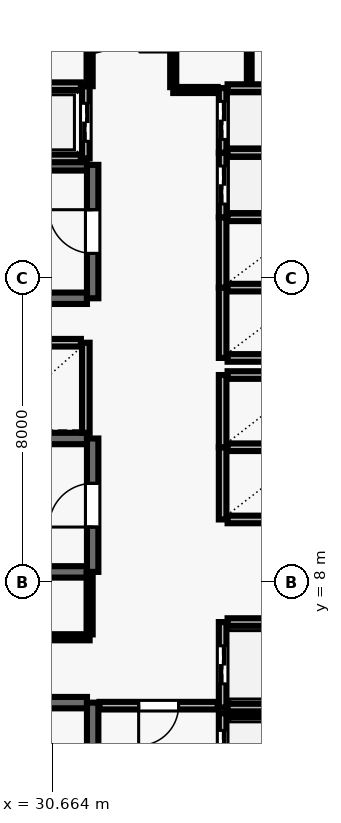
"""IFC4 building model, lengths in metres.
Left out: names, types, materials, properties, quantities, classifications, styles, units other than length and angle.
Written with IfcOpenShell. Run it as: python <this file> out.ifc"""

import sys

from ifc_helpers import new_model, si_unit, direction, frame, frame_2d, origin, place, context, subcontext, project, spatial, rectangle, extrude, element, fill, save


model = new_model("IFC4")
c1 = context("Model", 3, precision=1e-05, world=origin(), true_north=direction((0.0, 1.0)))
c2 = subcontext(c1, "Body", "Model", "MODEL_VIEW")
j1 = project(units=[si_unit("LENGTHUNIT", "METRE"), si_unit("PLANEANGLEUNIT", "RADIAN")], contexts=[c1])
p1 = place(None, origin())
s1 = spatial("IfcSite", under=j1, at=p1, CompositionType="ELEMENT")
p2 = place(p1, origin())
s2 = spatial("IfcBuilding", under=s1, at=p2, CompositionType="ELEMENT")
p3 = place(p2, frame((0.0, 0.0, 158.0)))
s3 = spatial("IfcBuildingStorey", under=s2, at=p3, CompositionType="ELEMENT", Elevation=158.0)
p4 = place(p3, frame((31.58, 4.83, 0.0), z_axis=(0.0, 0.0, 1.0), x_axis=(-1.0, 0.0, 0.0)))
e1 = element("IfcWall", 1, at=p4, inside=s3, PredefinedType="SHEAR", context=c2, shape_type="SweptSolid", body=[
    extrude(rectangle(XDim=8.36, YDim=0.3, at=frame_2d((4.18, 0.0))), origin(), (0.0, 0.0, 1.0), 3.69),
])
p5 = place(p3, frame((31.73, 0.96, 0.0), z_axis=(0.0, 0.0, 1.0), x_axis=(0.0, 1.0, 0.0)))
e2 = element("IfcWall", 2, at=p5, inside=s3, PredefinedType="SHEAR", context=c2, shape_type="SweptSolid", body=[
    extrude(rectangle(XDim=3.87, YDim=0.3, at=frame_2d((1.935, 0.0))), origin(), (0.0, 0.0, 1.0), 3.69),
])
p6 = place(p5, frame((1.54, 0.0, 0.0)))
e3 = element("IfcOpeningElement", 3, at=p6, cuts=e2, PredefinedType="OPENING", context=c2, shape_type="SweptSolid", body=[
    extrude(rectangle(XDim=1.15, YDim=2.15, at=frame_2d((0.575, 1.075))), frame((0.0, 0.16, 0.0), z_axis=(0.0, -1.0, 0.0), x_axis=(1.0, 0.0, 0.0)), (0.0, 0.0, 1.0), 0.32),
])
for number, where, z_axis, x_axis in (
    (4, (31.58, 18.98, 0.0), (0.0, 0.0, 1.0), (-1.0, 0.0, 0.0)),
    (5, (23.22, 15.47, 0.0), (0.0, 0.0, 1.0), (1.0, 0.0, 0.0)),
):
    element("IfcWall", number, at=place(p3, frame(where, z_axis=z_axis, x_axis=x_axis)), inside=s3, PredefinedType="SHEAR", context=c2, shape_type="SweptSolid", body=[
        extrude(rectangle(XDim=8.36, YDim=0.3, at=frame_2d((4.18, 0.0))), origin(), (0.0, 0.0, 1.0), 3.69),
    ])
p7 = place(p3, frame((31.73, 15.47, 0.0), z_axis=(0.0, 0.0, 1.0), x_axis=(0.0, 1.0, 0.0)))
e6 = element("IfcWall", 6, at=p7, inside=s3, PredefinedType="SHEAR", context=c2, shape_type="SweptSolid", body=[
    extrude(rectangle(XDim=3.51, YDim=0.3, at=frame_2d((1.755, 0.0))), origin(), (0.0, 0.0, 1.0), 3.69),
])
p8 = place(p7, frame((1.18, 0.0, 0.0)))
e7 = element("IfcOpeningElement", 7, at=p8, cuts=e6, PredefinedType="OPENING", context=c2, shape_type="SweptSolid", body=[
    extrude(rectangle(XDim=1.15, YDim=2.15, at=frame_2d((0.575, 1.075))), frame((0.0, 0.16, 0.0), z_axis=(0.0, -1.0, 0.0), x_axis=(1.0, 0.0, 0.0)), (0.0, 0.0, 1.0), 0.32),
])
for number, where, z_axis, x_axis in (
    (8, (31.58, 11.78, 0.0), (0.0, 0.0, 1.0), (-1.0, 0.0, 0.0)),
    (9, (23.22, 8.27, 0.0), (0.0, 0.0, 1.0), (1.0, 0.0, 0.0)),
):
    element("IfcWall", number, at=place(p3, frame(where, z_axis=z_axis, x_axis=x_axis)), inside=s3, PredefinedType="SHEAR", context=c2, shape_type="SweptSolid", body=[
        extrude(rectangle(XDim=8.36, YDim=0.3, at=frame_2d((4.18, 0.0))), origin(), (0.0, 0.0, 1.0), 3.69),
    ])
p9 = place(p3, frame((31.73, 8.27, 0.0), z_axis=(0.0, 0.0, 1.0), x_axis=(0.0, 1.0, 0.0)))
e10 = element("IfcWall", 10, at=p9, inside=s3, PredefinedType="SHEAR", context=c2, shape_type="SweptSolid", body=[
    extrude(rectangle(XDim=3.51, YDim=0.3, at=frame_2d((1.755, 0.0))), origin(), (0.0, 0.0, 1.0), 3.69),
])
p10 = place(p9, frame((1.18, 0.0, 0.0)))
e11 = element("IfcOpeningElement", 11, at=p10, cuts=e10, PredefinedType="OPENING", context=c2, shape_type="SweptSolid", body=[
    extrude(rectangle(XDim=1.15, YDim=2.15, at=frame_2d((0.575, 1.075))), frame((0.0, 0.16, 0.0), z_axis=(0.0, -1.0, 0.0), x_axis=(1.0, 0.0, 0.0)), (0.0, 0.0, 1.0), 0.32),
])
p11 = place(p3, frame((35.15, 4.55, 0.0), z_axis=(0.0, 0.0, 1.0), x_axis=(0.0, -1.0, 0.0)))
e12 = element("IfcWall", 12, at=p11, inside=s3, PredefinedType="SOLIDWALL", context=c2, shape_type="SweptSolid", body=[
    extrude(rectangle(XDim=2.1, YDim=0.2, at=frame_2d((1.05, 0.0))), origin(), (0.0, 0.0, 1.0), 3.69),
])
p12 = place(p11, frame((0.45, 0.0, 0.0)))
e13 = element("IfcOpeningElement", 13, at=p12, cuts=e12, PredefinedType="OPENING", context=c2, shape_type="SweptSolid", body=[
    extrude(rectangle(XDim=1.2, YDim=2.15, at=frame_2d((0.6, 1.075))), frame((0.0, 0.11, 0.0), z_axis=(0.0, -1.0, 0.0), x_axis=(1.0, 0.0, 0.0)), (0.0, 0.0, 1.0), 0.22),
])
p13 = place(p3, frame((37.42, 4.55, 0.0), z_axis=(0.0, 0.0, 1.0), x_axis=(-1.0, 0.0, 0.0)))
e14 = element("IfcWall", 14, at=p13, inside=s3, PredefinedType="SOLIDWALL", context=c2, shape_type="SweptSolid", body=[
    extrude(rectangle(XDim=2.14, YDim=0.2, at=frame_2d((1.07, 0.0))), origin(), (0.0, 0.0, 1.0), 3.69),
])
p14 = place(p3, frame((35.15, 6.95, 0.0), z_axis=(0.0, 0.0, 1.0), x_axis=(0.0, -1.0, 0.0)))
e15 = element("IfcWall", 15, at=p14, inside=s3, PredefinedType="SOLIDWALL", context=c2, shape_type="SweptSolid", body=[
    extrude(rectangle(XDim=2.25, YDim=0.2, at=frame_2d((1.125, 0.0))), origin(), (0.0, 0.0, 1.0), 3.69),
])
p15 = place(p14, frame((0.625, 0.0, 0.0)))
e16 = element("IfcOpeningElement", 16, at=p15, cuts=e15, PredefinedType="OPENING", context=c2, shape_type="SweptSolid", body=[
    extrude(rectangle(XDim=1.0, YDim=2.1, at=frame_2d((0.5, 1.05))), frame((0.0, 0.11, 0.0), z_axis=(0.0, -1.0, 0.0), x_axis=(1.0, 0.0, 0.0)), (0.0, 0.0, 1.0), 0.22),
])
for number, where, z_axis, x_axis in (
    (17, (35.28, 4.7, 0.0), (0.0, 0.0, 1.0), (1.0, 0.0, 0.0)),
    (18, (37.42, 6.95, 0.0), (0.0, 0.0, 1.0), (-1.0, 0.0, 0.0)),
):
    element("IfcWall", number, at=place(p3, frame(where, z_axis=z_axis, x_axis=x_axis)), inside=s3, PredefinedType="SOLIDWALL", context=c2, shape_type="SweptSolid", body=[
        extrude(rectangle(XDim=2.14, YDim=0.2, at=frame_2d((1.07, 0.0))), origin(), (0.0, 0.0, 1.0), 3.69),
    ])
p16 = place(p3, frame((35.15, 11.55, 0.0), z_axis=(0.0, 0.0, 1.0), x_axis=(0.0, -1.0, 0.0)))
e19 = element("IfcWall", 19, at=p16, inside=s3, PredefinedType="SOLIDWALL", context=c2, shape_type="SweptSolid", body=[
    extrude(rectangle(XDim=1.9, YDim=0.2, at=frame_2d((0.95, 0.0))), origin(), (0.0, 0.0, 1.0), 3.69),
])
for number, where, z_axis, x_axis in (
    (20, (35.28, 9.65, 0.0), (0.0, 0.0, 1.0), (1.0, 0.0, 0.0)),
    (21, (37.42, 11.55, 0.0), (0.0, 0.0, 1.0), (-1.0, 0.0, 0.0)),
):
    element("IfcWall", number, at=place(p3, frame(where, z_axis=z_axis, x_axis=x_axis)), inside=s3, PredefinedType="SOLIDWALL", context=c2, shape_type="SweptSolid", body=[
        extrude(rectangle(XDim=2.14, YDim=0.2, at=frame_2d((1.07, 0.0))), origin(), (0.0, 0.0, 1.0), 3.69),
    ])
p17 = place(p3, frame((35.15, 13.45, 0.0), z_axis=(0.0, 0.0, 1.0), x_axis=(0.0, -1.0, 0.0)))
e22 = element("IfcWall", 22, at=p17, inside=s3, PredefinedType="SOLIDWALL", context=c2, shape_type="SweptSolid", body=[
    extrude(rectangle(XDim=1.9, YDim=0.2, at=frame_2d((0.95, 0.0))), origin(), (0.0, 0.0, 1.0), 3.69),
])
p18 = place(p3, frame((37.42, 13.45, 0.0), z_axis=(0.0, 0.0, 1.0), x_axis=(-1.0, 0.0, 0.0)))
e23 = element("IfcWall", 23, at=p18, inside=s3, PredefinedType="SOLIDWALL", context=c2, shape_type="SweptSolid", body=[
    extrude(rectangle(XDim=2.14, YDim=0.2, at=frame_2d((1.07, 0.0))), origin(), (0.0, 0.0, 1.0), 3.69),
])
p19 = place(p3, frame((31.55, 11.93, 0.0), z_axis=(0.0, 0.0, 1.0), x_axis=(0.0, 1.0, 0.0)))
e24 = element("IfcWall", 24, at=p19, inside=s3, PredefinedType="SOLIDWALL", context=c2, shape_type="SweptSolid", body=[
    extrude(rectangle(XDim=2.37, YDim=0.2, at=frame_2d((1.185, 0.0))), origin(), (0.0, 0.0, 1.0), 3.69),
])
p20 = place(p3, frame((31.42, 14.3, 0.0), z_axis=(0.0, 0.0, 1.0), x_axis=(-1.0, 0.0, 0.0)))
e25 = element("IfcWall", 25, at=p20, inside=s3, PredefinedType="SOLIDWALL", context=c2, shape_type="SweptSolid", body=[
    extrude(rectangle(XDim=2.44, YDim=0.2, at=frame_2d((1.22, 0.0))), origin(), (0.0, 0.0, 1.0), 3.69),
])
p21 = place(p3, frame((35.15, 15.75, 0.0), z_axis=(0.0, 0.0, 1.0), x_axis=(0.0, -1.0, 0.0)))
e26 = element("IfcWall", 26, at=p21, inside=s3, PredefinedType="SOLIDWALL", context=c2, shape_type="SweptSolid", body=[
    extrude(rectangle(XDim=1.85, YDim=0.2, at=frame_2d((0.925, 0.0))), origin(), (0.0, 0.0, 1.0), 3.69),
])
for number, where, z_axis, x_axis in (
    (27, (35.28, 13.9, 0.0), (0.0, 0.0, 1.0), (1.0, 0.0, 0.0)),
    (28, (37.42, 15.75, 0.0), (0.0, 0.0, 1.0), (-1.0, 0.0, 0.0)),
):
    element("IfcWall", number, at=place(p3, frame(where, z_axis=z_axis, x_axis=x_axis)), inside=s3, PredefinedType="SOLIDWALL", context=c2, shape_type="SweptSolid", body=[
        extrude(rectangle(XDim=2.14, YDim=0.2, at=frame_2d((1.07, 0.0))), origin(), (0.0, 0.0, 1.0), 3.69),
    ])
p22 = place(p3, frame((35.15, 17.6, 0.0), z_axis=(0.0, 0.0, 1.0), x_axis=(0.0, -1.0, 0.0)))
e29 = element("IfcWall", 29, at=p22, inside=s3, PredefinedType="SOLIDWALL", context=c2, shape_type="SweptSolid", body=[
    extrude(rectangle(XDim=1.85, YDim=0.2, at=frame_2d((0.925, 0.0))), origin(), (0.0, 0.0, 1.0), 3.69),
])
p23 = place(p3, frame((37.42, 17.6, 0.0), z_axis=(0.0, 0.0, 1.0), x_axis=(-1.0, 0.0, 0.0)))
e30 = element("IfcWall", 30, at=p23, inside=s3, PredefinedType="SOLIDWALL", context=c2, shape_type="SweptSolid", body=[
    extrude(rectangle(XDim=2.14, YDim=0.2, at=frame_2d((1.07, 0.0))), origin(), (0.0, 0.0, 1.0), 3.69),
])
p24 = place(p3, frame((35.15, 19.3, 0.0), z_axis=(0.0, 0.0, 1.0), x_axis=(0.0, -1.0, 0.0)))
e31 = element("IfcWall", 31, at=p24, inside=s3, PredefinedType="SOLIDWALL", context=c2, shape_type="SweptSolid", body=[
    extrude(rectangle(XDim=1.7, YDim=0.2, at=frame_2d((0.85, 0.0))), origin(), (0.0, 0.0, 1.0), 3.69),
])
p25 = place(p24, frame((0.35, 0.0, 0.0)))
e32 = element("IfcOpeningElement", 32, at=p25, cuts=e31, PredefinedType="OPENING", context=c2, shape_type="SweptSolid", body=[
    extrude(rectangle(XDim=1.0, YDim=2.1, at=frame_2d((0.5, 1.05))), frame((0.0, 0.11, 0.0), z_axis=(0.0, -1.0, 0.0), x_axis=(1.0, 0.0, 0.0)), (0.0, 0.0, 1.0), 0.22),
])
p26 = place(p3, frame((37.42, 19.3, 0.0), z_axis=(0.0, 0.0, 1.0), x_axis=(-1.0, 0.0, 0.0)))
e33 = element("IfcWall", 33, at=p26, inside=s3, PredefinedType="SOLIDWALL", context=c2, shape_type="SweptSolid", body=[
    extrude(rectangle(XDim=2.14, YDim=0.2, at=frame_2d((1.07, 0.0))), origin(), (0.0, 0.0, 1.0), 3.69),
])
p27 = place(p3, frame((35.15, 21.0, 0.0), z_axis=(0.0, 0.0, 1.0), x_axis=(0.0, -1.0, 0.0)))
e34 = element("IfcWall", 34, at=p27, inside=s3, PredefinedType="SOLIDWALL", context=c2, shape_type="SweptSolid", body=[
    extrude(rectangle(XDim=1.7, YDim=0.2, at=frame_2d((0.85, 0.0))), origin(), (0.0, 0.0, 1.0), 3.69),
])
p28 = place(p27, frame((0.35, 0.0, 0.0)))
e35 = element("IfcOpeningElement", 35, at=p28, cuts=e34, PredefinedType="OPENING", context=c2, shape_type="SweptSolid", body=[
    extrude(rectangle(XDim=1.0, YDim=2.1, at=frame_2d((0.5, 1.05))), frame((0.0, 0.11, 0.0), z_axis=(0.0, -1.0, 0.0), x_axis=(1.0, 0.0, 0.0)), (0.0, 0.0, 1.0), 0.22),
])
p29 = place(p3, frame((37.42, 21.0, 0.0), z_axis=(0.0, 0.0, 1.0), x_axis=(-1.0, 0.0, 0.0)))
e36 = element("IfcWall", 36, at=p29, inside=s3, PredefinedType="SOLIDWALL", context=c2, shape_type="SweptSolid", body=[
    extrude(rectangle(XDim=2.14, YDim=0.2, at=frame_2d((1.07, 0.0))), origin(), (0.0, 0.0, 1.0), 3.69),
])
p30 = place(p3, frame((31.55, 19.15, 0.0), z_axis=(0.0, 0.0, 1.0), x_axis=(0.0, 1.0, 0.0)))
e37 = element("IfcWall", 37, at=p30, inside=s3, PredefinedType="SOLIDWALL", context=c2, shape_type="SweptSolid", body=[
    extrude(rectangle(XDim=1.9, YDim=0.2, at=frame_2d((0.95, 0.0))), origin(), (0.0, 0.0, 1.0), 3.69),
])
p31 = place(p30, frame((0.45, 0.0, 0.0)))
e38 = element("IfcOpeningElement", 38, at=p31, cuts=e37, PredefinedType="OPENING", context=c2, shape_type="SweptSolid", body=[
    extrude(rectangle(XDim=1.0, YDim=2.1, at=frame_2d((0.5, 1.05))), frame((0.0, 0.11, 0.0), z_axis=(0.0, -1.0, 0.0), x_axis=(1.0, 0.0, 0.0)), (0.0, 0.0, 1.0), 0.22),
])
for number, where, z_axis, x_axis in (
    (39, (28.98, 19.15, 0.0), (0.0, 0.0, 1.0), (1.0, 0.0, 0.0)),
    (40, (31.42, 21.05, 0.0), (0.0, 0.0, 1.0), (-1.0, 0.0, 0.0)),
):
    element("IfcWall", number, at=place(p3, frame(where, z_axis=z_axis, x_axis=x_axis)), inside=s3, PredefinedType="SOLIDWALL", context=c2, shape_type="SweptSolid", body=[
        extrude(rectangle(XDim=2.44, YDim=0.2, at=frame_2d((1.22, 0.0))), origin(), (0.0, 0.0, 1.0), 3.69),
    ])
p32 = place(p3, frame((31.65, 6.55, 0.0), z_axis=(0.0, 0.0, 1.0), x_axis=(-1.0, 0.0, 0.0)))
e41 = element("IfcWall", 41, at=p32, inside=s3, PredefinedType="PARTITIONING", context=c2, shape_type="SweptSolid", body=[
    extrude(rectangle(XDim=4.75, YDim=0.16, at=frame_2d((2.375, 0.0))), origin(), (0.0, 0.0, 1.0), 3.69),
])
p33 = place(p32, frame((1.935, 0.0, 0.0)))
e42 = element("IfcOpeningElement", 42, at=p33, cuts=e41, PredefinedType="OPENING", context=c2, shape_type="SweptSolid", body=[
    extrude(rectangle(XDim=0.88, YDim=2.1, at=frame_2d((0.44, 1.05))), frame((0.0, 0.09, 0.0), z_axis=(0.0, -1.0, 0.0), x_axis=(1.0, 0.0, 0.0)), (0.0, 0.0, 1.0), 0.18),
])
p34 = place(p3, frame((35.02, 4.75, 0.0), z_axis=(0.0, 0.0, 1.0), x_axis=(-1.0, 0.0, 0.0)))
e43 = element("IfcWall", 43, at=p34, inside=s3, PredefinedType="SOLIDWALL", context=c2, shape_type="SweptSolid", body=[
    extrude(rectangle(XDim=3.11, YDim=0.2, at=frame_2d((1.555, 0.0))), origin(), (0.0, 0.0, 1.0), 3.69),
])
p35 = place(p34, frame((1.03, 0.0, 0.0)))
e44 = element("IfcOpeningElement", 44, at=p35, cuts=e43, PredefinedType="OPENING", context=c2, shape_type="SweptSolid", body=[
    extrude(rectangle(XDim=1.05, YDim=2.15, at=frame_2d((0.525, 1.075))), frame((0.0, 0.11, 0.0), z_axis=(0.0, -1.0, 0.0), x_axis=(1.0, 0.0, 0.0)), (0.0, 0.0, 1.0), 0.22),
])
p36 = place(p3, frame((35.02, 20.95, 0.0), z_axis=(0.0, 0.0, 1.0), x_axis=(-1.0, 0.0, 0.0)))
e45 = element("IfcWall", 45, at=p36, inside=s3, PredefinedType="PARTITIONING", context=c2, shape_type="SweptSolid", body=[
    extrude(rectangle(XDim=1.17, YDim=0.16, at=frame_2d((0.585, 0.0))), origin(), (0.0, 0.0, 1.0), 3.69),
])
p37 = place(p3, frame((31.65, 8.24, 0.0), z_axis=(0.0, 0.0, 1.0), x_axis=(0.0, -1.0, 0.0)))
e46 = element("IfcWall", 46, at=p37, inside=s3, PredefinedType="PARTITIONING", context=c2, shape_type="SweptSolid", body=[
    extrude(rectangle(XDim=1.615, YDim=0.16, at=frame_2d((0.808, 0.0))), origin(), (0.0, 0.0, 1.0), 3.69),
])
p38 = place(p3, frame((31.65, 23.775, 0.0), z_axis=(0.0, 0.0, 1.0), x_axis=(0.0, -1.0, 0.0)))
e47 = element("IfcWall", 47, at=p38, inside=s3, PredefinedType="PARTITIONING", context=c2, shape_type="SweptSolid", body=[
    extrude(rectangle(XDim=2.725, YDim=0.16, at=frame_2d((1.362, 0.0))), origin(), (0.0, 0.0, 1.0), 3.69),
])
p39 = place(p38, frame((0.862, 0.0, 0.0)))
e48 = element("IfcOpeningElement", 48, at=p39, cuts=e47, PredefinedType="OPENING", context=c2, shape_type="SweptSolid", body=[
    extrude(rectangle(XDim=1.0, YDim=2.1, at=frame_2d((0.5, 1.05))), frame((0.0, 0.09, 0.0), z_axis=(0.0, -1.0, 0.0), x_axis=(1.0, 0.0, 0.0)), (0.0, 0.0, 1.0), 0.18),
])
p40 = place(p3, frame((33.85, 21.025, 0.0), z_axis=(0.0, 0.0, 1.0), x_axis=(0.0, 1.0, 0.0)))
e49 = element("IfcWall", 49, at=p40, inside=s3, PredefinedType="PARTITIONING", context=c2, shape_type="SweptSolid", body=[
    extrude(rectangle(XDim=2.75, YDim=0.16, at=frame_2d((1.375, 0.0))), origin(), (0.0, 0.0, 1.0), 3.69),
])
p41 = place(p40, frame((0.925, 0.0, 0.0)))
e50 = element("IfcOpeningElement", 50, at=p41, cuts=e49, PredefinedType="OPENING", context=c2, shape_type="SweptSolid", body=[
    extrude(rectangle(XDim=0.9, YDim=2.1, at=frame_2d((0.45, 1.05))), frame((0.0, 0.09, 0.0), z_axis=(0.0, -1.0, 0.0), x_axis=(1.0, 0.0, 0.0)), (0.0, 0.0, 1.0), 0.18),
])
p42 = place(p3, frame((35.85, 21.13, 0.0), z_axis=(0.0, 0.0, 1.0), x_axis=(0.0, 1.0, 0.0)))
e51 = element("IfcWall", 51, at=p42, inside=s3, PredefinedType="PARTITIONING", context=c2, shape_type="SweptSolid", body=[
    extrude(rectangle(XDim=2.645, YDim=0.125, at=frame_2d((1.323, 0.0))), origin(), (0.0, 0.0, 1.0), 3.69),
])
p43 = place(p42, frame((0.872, 0.0, 0.0)))
e52 = element("IfcOpeningElement", 52, at=p43, cuts=e51, PredefinedType="OPENING", context=c2, shape_type="SweptSolid", body=[
    extrude(rectangle(XDim=0.9, YDim=2.1, at=frame_2d((0.45, 1.05))), frame((0.0, 0.073, 0.0), z_axis=(0.0, -1.0, 0.0), x_axis=(1.0, 0.0, 0.0)), (0.0, 0.0, 1.0), 0.145),
])
p44 = place(p8, origin())
e53 = element("IfcDoor", 53, at=p44, inside=s3, OperationType="SINGLE_SWING_RIGHT", PredefinedType="DOOR", context=c2, shape_type="SweptSolid", body=[
    extrude(rectangle(XDim=1.15, YDim=2.15, at=frame_2d((0.575, 1.075))), frame((0.0, 0.025, 0.0), z_axis=(0.0, -1.0, 0.0), x_axis=(1.0, 0.0, 0.0)), (0.0, 0.0, 1.0), 0.05),
])
fill(e7, e53)
p45 = place(p10, origin())
e54 = element("IfcDoor", 54, at=p45, inside=s3, OperationType="SINGLE_SWING_LEFT", PredefinedType="DOOR", context=c2, shape_type="SweptSolid", body=[
    extrude(rectangle(XDim=1.15, YDim=2.15, at=frame_2d((0.575, 1.075))), frame((0.0, 0.025, 0.0), z_axis=(0.0, -1.0, 0.0), x_axis=(1.0, 0.0, 0.0)), (0.0, 0.0, 1.0), 0.05),
])
fill(e11, e54)
p46 = place(p12, origin())
e55 = element("IfcDoor", 55, at=p46, inside=s3, OperationType="DOUBLE_DOOR_SLIDING", PredefinedType="DOOR", context=c2, shape_type="SweptSolid", body=[
    extrude(rectangle(XDim=1.2, YDim=2.15, at=frame_2d((0.6, 1.075))), frame((0.0, 0.025, 0.0), z_axis=(0.0, -1.0, 0.0), x_axis=(1.0, 0.0, 0.0)), (0.0, 0.0, 1.0), 0.05),
])
fill(e13, e55)
p47 = place(p15, origin())
e56 = element("IfcDoor", 56, at=p47, inside=s3, OperationType="DOUBLE_DOOR_SLIDING", PredefinedType="DOOR", context=c2, shape_type="SweptSolid", body=[
    extrude(rectangle(XDim=1.0, YDim=2.1, at=frame_2d((0.5, 1.05))), frame((0.0, 0.025, 0.0), z_axis=(0.0, -1.0, 0.0), x_axis=(1.0, 0.0, 0.0)), (0.0, 0.0, 1.0), 0.05),
])
fill(e16, e56)
p48 = place(p25, origin())
e57 = element("IfcDoor", 57, at=p48, inside=s3, OperationType="DOUBLE_DOOR_SLIDING", PredefinedType="DOOR", context=c2, shape_type="SweptSolid", body=[
    extrude(rectangle(XDim=1.0, YDim=2.1, at=frame_2d((0.5, 1.05))), frame((0.0, 0.025, 0.0), z_axis=(0.0, -1.0, 0.0), x_axis=(1.0, 0.0, 0.0)), (0.0, 0.0, 1.0), 0.05),
])
fill(e32, e57)
p49 = place(p28, origin())
e58 = element("IfcDoor", 58, at=p49, inside=s3, OperationType="DOUBLE_DOOR_SLIDING", PredefinedType="DOOR", context=c2, shape_type="SweptSolid", body=[
    extrude(rectangle(XDim=1.0, YDim=2.1, at=frame_2d((0.5, 1.05))), frame((0.0, 0.025, 0.0), z_axis=(0.0, -1.0, 0.0), x_axis=(1.0, 0.0, 0.0)), (0.0, 0.0, 1.0), 0.05),
])
fill(e35, e58)
p50 = place(p31, origin())
e59 = element("IfcDoor", 59, at=p50, inside=s3, OperationType="DOUBLE_DOOR_SLIDING", PredefinedType="DOOR", context=c2, shape_type="SweptSolid", body=[
    extrude(rectangle(XDim=1.0, YDim=2.1, at=frame_2d((0.5, 1.05))), frame((0.0, 0.025, 0.0), z_axis=(0.0, -1.0, 0.0), x_axis=(1.0, 0.0, 0.0)), (0.0, 0.0, 1.0), 0.05),
])
fill(e38, e59)
p51 = place(p35, origin())
e60 = element("IfcDoor", 60, at=p51, inside=s3, OperationType="SINGLE_SWING_RIGHT", PredefinedType="DOOR", context=c2, shape_type="SweptSolid", body=[
    extrude(rectangle(XDim=1.05, YDim=2.15, at=frame_2d((0.525, 1.075))), frame((0.0, 0.025, 0.0), z_axis=(0.0, -1.0, 0.0), x_axis=(1.0, 0.0, 0.0)), (0.0, 0.0, 1.0), 0.05),
])
fill(e44, e60)
p52 = place(p39, origin())
e61 = element("IfcDoor", 61, at=p52, inside=s3, OperationType="SINGLE_SWING_LEFT", PredefinedType="DOOR", context=c2, shape_type="SweptSolid", body=[
    extrude(rectangle(XDim=1.0, YDim=2.1, at=frame_2d((0.5, 1.05))), frame((0.0, 0.025, 0.0), z_axis=(0.0, -1.0, 0.0), x_axis=(1.0, 0.0, 0.0)), (0.0, 0.0, 1.0), 0.05),
])
fill(e48, e61)
save(model, sys.argv[1])
